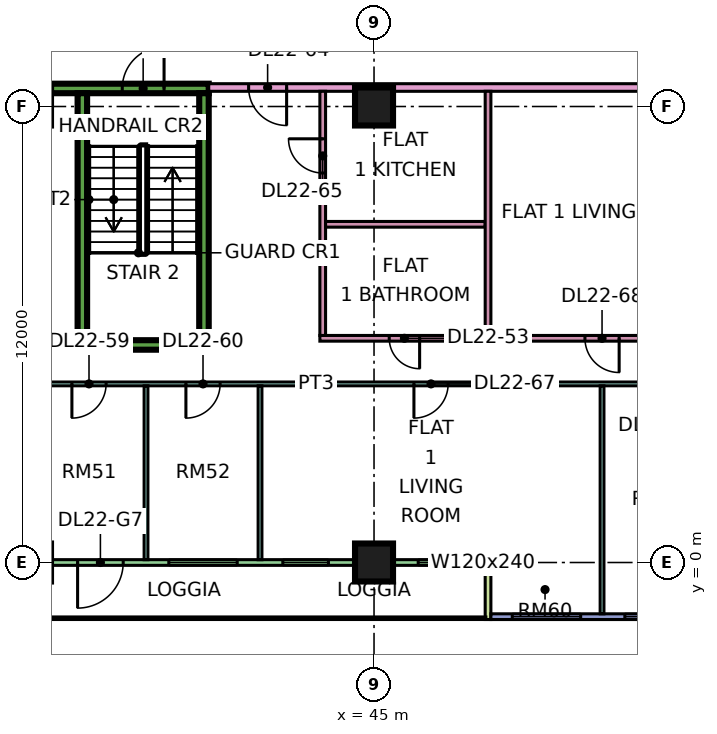
"""IFC4 building model, lengths in metres.
Left out: names, types, materials, properties, quantities, classifications, styles, units other than length and angle.
Written with IfcOpenShell. Run it as: python <this file> out.ifc"""

import sys

from ifc_helpers import new_model, si_unit, direction, frame, frame_2d, origin, origin_2d, place, context, subcontext, project, spatial, rectangle, extrude, element, fill, save


model = new_model("IFC4")
c1 = context("Model", 3, precision=1e-05, world=origin(), true_north=direction((0.0, 1.0)))
c2 = subcontext(c1, "Body", "Model", "MODEL_VIEW")
j1 = project(units=[si_unit("LENGTHUNIT", "METRE"), si_unit("PLANEANGLEUNIT", "RADIAN")], contexts=[c1])
p1 = place(None, origin())
s1 = spatial("IfcSite", under=j1, at=p1, CompositionType="ELEMENT")
p2 = place(p1, origin())
s2 = spatial("IfcBuilding", under=s1, at=p2, CompositionType="ELEMENT")
p3 = place(p2, frame((0.0, 0.0, 99.4)))
s3 = spatial("IfcBuildingStorey", under=s2, at=p3, CompositionType="ELEMENT", Elevation=99.4)
for number, where, z_axis, x_axis in (
    (1, (45.0, 0.0, 0.0), (0.0, 0.0, 1.0), (1.0, 0.0, 0.0)),
    (2, (45.0, 12.0, 0.0), (0.0, 0.0, 1.0), (1.0, 0.0, 0.0)),
):
    element("IfcColumn", number, at=place(p3, frame(where, z_axis=z_axis, x_axis=x_axis)), inside=s3, PredefinedType="COLUMN", context=c2, shape_type="SweptSolid", body=[
        extrude(rectangle(XDim=1.0, YDim=1.0, at=origin_2d()), origin(), (0.0, 0.0, 1.0), 3.75),
    ])
p4 = place(p3, frame((37.2, 5.725, 0.0), z_axis=(0.0, 0.0, 1.0), x_axis=(1.0, 0.0, 0.0)))
e3 = element("IfcWall", 3, at=p4, inside=s3, PredefinedType="SHEAR", context=c2, shape_type="SweptSolid", body=[
    extrude(rectangle(XDim=3.45, YDim=0.25, at=frame_2d((1.725, 0.0))), origin(), (0.0, 0.0, 1.0), 3.75),
])
p5 = place(p3, frame((36.5, 12.475, 0.0), z_axis=(0.0, 0.0, 1.0), x_axis=(1.0, 0.0, 0.0)))
e4 = element("IfcWall", 4, at=p5, inside=s3, PredefinedType="SHEAR", context=c2, shape_type="SweptSolid", body=[
    extrude(rectangle(XDim=4.15, YDim=0.25, at=frame_2d((2.075, 0.0))), origin(), (0.0, 0.0, 1.0), 3.75),
])
p6 = place(p5, frame((1.875, 0.0, 0.0)))
e5 = element("IfcOpeningElement", 5, at=p6, cuts=e4, PredefinedType="OPENING", context=c2, shape_type="SweptSolid", body=[
    extrude(rectangle(XDim=1.1, YDim=2.2, at=frame_2d((0.55, 1.1))), frame((0.0, 0.135, 0.0), z_axis=(0.0, -1.0, 0.0), x_axis=(1.0, 0.0, 0.0)), (0.0, 0.0, 1.0), 0.27),
])
for number, where, z_axis, x_axis in (
    (6, (37.325, 5.85, 0.0), (0.0, 0.0, 1.0), (0.0, 1.0, 0.0)),
    (7, (40.525, 5.85, 0.0), (0.0, 0.0, 1.0), (0.0, 1.0, 0.0)),
):
    element("IfcWall", number, at=place(p3, frame(where, z_axis=z_axis, x_axis=x_axis)), inside=s3, PredefinedType="SHEAR", context=c2, shape_type="SweptSolid", body=[
        extrude(rectangle(XDim=6.5, YDim=0.25, at=frame_2d((3.25, 0.0))), origin(), (0.0, 0.0, 1.0), 3.75),
    ])
p7 = place(p3, frame((36.075, 0.0, 0.0), z_axis=(0.0, 0.0, 1.0), x_axis=(1.0, 0.0, 0.0)))
e8 = element("IfcWall", 8, at=p7, inside=s3, PredefinedType="SOLIDWALL", context=c2, shape_type="SweptSolid", body=[
    extrude(rectangle(XDim=11.85, YDim=0.15, at=frame_2d((5.925, 0.0))), origin(), (0.0, 0.0, 1.0), 3.35),
])
p8 = place(p7, frame((1.125, 0.0, 0.0)))
e9 = element("IfcOpeningElement", 9, at=p8, cuts=e8, PredefinedType="OPENING", context=c2, shape_type="SweptSolid", body=[
    extrude(rectangle(XDim=1.2, YDim=2.4, at=frame_2d((0.6, 1.2))), frame((0.0, 0.085, 0.0), z_axis=(0.0, -1.0, 0.0), x_axis=(1.0, 0.0, 0.0)), (0.0, 0.0, 1.0), 0.17),
])
p9 = place(p7, frame((3.525, 0.0, 0.45)))
e10 = element("IfcOpeningElement", 10, at=p9, cuts=e8, PredefinedType="OPENING", context=c2, shape_type="SweptSolid", body=[
    extrude(rectangle(XDim=1.8, YDim=2.4, at=frame_2d((0.9, 1.2))), frame((0.0, 0.085, 0.0), z_axis=(0.0, -1.0, 0.0), x_axis=(1.0, 0.0, 0.0)), (0.0, 0.0, 1.0), 0.17),
])
p10 = place(p7, frame((6.525, 0.0, 0.45)))
e11 = element("IfcOpeningElement", 11, at=p10, cuts=e8, PredefinedType="OPENING", context=c2, shape_type="SweptSolid", body=[
    extrude(rectangle(XDim=1.2, YDim=2.4, at=frame_2d((0.6, 1.2))), frame((0.0, 0.085, 0.0), z_axis=(0.0, -1.0, 0.0), x_axis=(1.0, 0.0, 0.0)), (0.0, 0.0, 1.0), 0.17),
])
p11 = place(p7, frame((10.087, 0.0, 0.45)))
e12 = element("IfcOpeningElement", 12, at=p11, cuts=e8, PredefinedType="OPENING", context=c2, shape_type="SweptSolid", body=[
    extrude(rectangle(XDim=1.2, YDim=2.4, at=frame_2d((0.6, 1.2))), frame((0.0, 0.085, 0.0), z_axis=(0.0, -1.0, 0.0), x_axis=(1.0, 0.0, 0.0)), (0.0, 0.0, 1.0), 0.17),
])
p12 = place(p3, frame((48.0, -1.5, 0.0), z_axis=(0.0, 0.0, 1.0), x_axis=(0.0, 1.0, 0.0)))
e13 = element("IfcWall", 13, at=p12, inside=s3, PredefinedType="SOLIDWALL", context=c2, shape_type="SweptSolid", body=[
    extrude(rectangle(XDim=1.5, YDim=0.15, at=frame_2d((0.75, 0.0))), origin(), (0.0, 0.0, 1.0), 3.35),
])
p13 = place(p3, frame((48.075, -1.425, 0.0), z_axis=(0.0, 0.0, 1.0), x_axis=(1.0, 0.0, 0.0)))
e14 = element("IfcWall", 14, at=p13, inside=s3, PredefinedType="SOLIDWALL", context=c2, shape_type="SweptSolid", body=[
    extrude(rectangle(XDim=11.85, YDim=0.15, at=frame_2d((5.925, 0.0))), origin(), (0.0, 0.0, 1.0), 3.35),
])
p14 = place(p13, frame((0.562, 0.0, 0.45)))
e15 = element("IfcOpeningElement", 15, at=p14, cuts=e14, PredefinedType="OPENING", context=c2, shape_type="SweptSolid", body=[
    extrude(rectangle(XDim=1.8, YDim=2.4, at=frame_2d((0.9, 1.2))), frame((0.0, 0.085, 0.0), z_axis=(0.0, -1.0, 0.0), x_axis=(1.0, 0.0, 0.0)), (0.0, 0.0, 1.0), 0.17),
])
p15 = place(p13, frame((3.525, 0.0, 0.45)))
e16 = element("IfcOpeningElement", 16, at=p15, cuts=e14, PredefinedType="OPENING", context=c2, shape_type="SweptSolid", body=[
    extrude(rectangle(XDim=1.8, YDim=2.4, at=frame_2d((0.9, 1.2))), frame((0.0, 0.085, 0.0), z_axis=(0.0, -1.0, 0.0), x_axis=(1.0, 0.0, 0.0)), (0.0, 0.0, 1.0), 0.17),
])
p16 = place(p13, frame((6.525, 0.0, 0.45)))
e17 = element("IfcOpeningElement", 17, at=p16, cuts=e14, PredefinedType="OPENING", context=c2, shape_type="SweptSolid", body=[
    extrude(rectangle(XDim=1.8, YDim=2.4, at=frame_2d((0.9, 1.2))), frame((0.0, 0.085, 0.0), z_axis=(0.0, -1.0, 0.0), x_axis=(1.0, 0.0, 0.0)), (0.0, 0.0, 1.0), 0.17),
])
p17 = place(p13, frame((9.488, 0.0, 0.45)))
e18 = element("IfcOpeningElement", 18, at=p17, cuts=e14, PredefinedType="OPENING", context=c2, shape_type="SweptSolid", body=[
    extrude(rectangle(XDim=1.8, YDim=2.4, at=frame_2d((0.9, 1.2))), frame((0.0, 0.085, 0.0), z_axis=(0.0, -1.0, 0.0), x_axis=(1.0, 0.0, 0.0)), (0.0, 0.0, 1.0), 0.17),
])
p18 = place(p3, frame((33.05, 4.7, 0.0), z_axis=(0.0, 0.0, 1.0), x_axis=(1.0, 0.0, 0.0)))
e19 = element("IfcWall", 19, at=p18, inside=s3, PredefinedType="PARTITIONING", context=c2, shape_type="SweptSolid", body=[
    extrude(rectangle(XDim=20.85, YDim=0.1, at=frame_2d((10.425, 0.0))), origin(), (0.0, 0.0, 1.0), 3.35),
])
p19 = place(p18, frame((1.0, 0.0, 0.0)))
e20 = element("IfcOpeningElement", 20, at=p19, cuts=e19, PredefinedType="OPENING", context=c2, shape_type="SweptSolid", body=[
    extrude(rectangle(XDim=0.9, YDim=2.1, at=frame_2d((0.45, 1.05))), frame((0.0, 0.06, 0.0), z_axis=(0.0, -1.0, 0.0), x_axis=(1.0, 0.0, 0.0)), (0.0, 0.0, 1.0), 0.12),
])
p20 = place(p18, frame((4.0, 0.0, 0.0)))
e21 = element("IfcOpeningElement", 21, at=p20, cuts=e19, PredefinedType="OPENING", context=c2, shape_type="SweptSolid", body=[
    extrude(rectangle(XDim=0.9, YDim=2.1, at=frame_2d((0.45, 1.05))), frame((0.0, 0.06, 0.0), z_axis=(0.0, -1.0, 0.0), x_axis=(1.0, 0.0, 0.0)), (0.0, 0.0, 1.0), 0.12),
])
p21 = place(p18, frame((7.0, 0.0, 0.0)))
e22 = element("IfcOpeningElement", 22, at=p21, cuts=e19, PredefinedType="OPENING", context=c2, shape_type="SweptSolid", body=[
    extrude(rectangle(XDim=0.9, YDim=2.1, at=frame_2d((0.45, 1.05))), frame((0.0, 0.06, 0.0), z_axis=(0.0, -1.0, 0.0), x_axis=(1.0, 0.0, 0.0)), (0.0, 0.0, 1.0), 0.12),
])
p22 = place(p18, frame((19.0, 0.0, 0.0)))
e23 = element("IfcOpeningElement", 23, at=p22, cuts=e19, PredefinedType="OPENING", context=c2, shape_type="SweptSolid", body=[
    extrude(rectangle(XDim=0.9, YDim=2.1, at=frame_2d((0.45, 1.05))), frame((0.0, 0.06, 0.0), z_axis=(0.0, -1.0, 0.0), x_axis=(1.0, 0.0, 0.0)), (0.0, 0.0, 1.0), 0.12),
])
p23 = place(p18, frame((13.0, 0.0, 0.0)))
e24 = element("IfcOpeningElement", 24, at=p23, cuts=e19, PredefinedType="OPENING", context=c2, shape_type="SweptSolid", body=[
    extrude(rectangle(XDim=0.9, YDim=2.1, at=frame_2d((0.45, 1.05))), frame((0.0, 0.06, 0.0), z_axis=(0.0, -1.0, 0.0), x_axis=(1.0, 0.0, 0.0)), (0.0, 0.0, 1.0), 0.12),
])
p24 = place(p3, frame((39.0, 0.074, 0.0), z_axis=(0.0, 0.0, 1.0), x_axis=(0.0, 1.0, 0.0)))
e25 = element("IfcWall", 25, at=p24, inside=s3, PredefinedType="PARTITIONING", context=c2, shape_type="SweptSolid", body=[
    extrude(rectangle(XDim=4.576, YDim=0.1, at=frame_2d((2.288, 0.0))), origin(), (0.0, 0.0, 1.0), 3.35),
])
p25 = place(p3, frame((40.65, 12.5, 0.0), z_axis=(0.0, 0.0, 1.0), x_axis=(1.0, 0.0, 0.0)))
e26 = element("IfcWall", 26, at=p25, inside=s3, PredefinedType="PARTITIONING", context=c2, shape_type="SweptSolid", body=[
    extrude(rectangle(XDim=31.276, YDim=0.2, at=frame_2d((15.638, 0.0))), origin(), (0.0, 0.0, 1.0), 3.35),
])
p26 = place(p25, frame((14.25, 0.0, 0.0)))
e27 = element("IfcOpeningElement", 27, at=p26, cuts=e26, PredefinedType="OPENING", context=c2, shape_type="SweptSolid", body=[
    extrude(rectangle(XDim=1.0, YDim=2.1, at=frame_2d((0.5, 1.05))), frame((0.0, 0.11, 0.0), z_axis=(0.0, -1.0, 0.0), x_axis=(1.0, 0.0, 0.0)), (0.0, 0.0, 1.0), 0.22),
])
p27 = place(p25, frame((1.05, 0.0, 0.0)))
e28 = element("IfcOpeningElement", 28, at=p27, cuts=e26, PredefinedType="OPENING", context=c2, shape_type="SweptSolid", body=[
    extrude(rectangle(XDim=1.0, YDim=2.1, at=frame_2d((0.5, 1.05))), frame((0.0, 0.11, 0.0), z_axis=(0.0, -1.0, 0.0), x_axis=(1.0, 0.0, 0.0)), (0.0, 0.0, 1.0), 0.22),
])
p28 = place(p3, frame((42.0, 0.074, 0.0), z_axis=(0.0, 0.0, 1.0), x_axis=(0.0, 1.0, 0.0)))
e29 = element("IfcWall", 29, at=p28, inside=s3, PredefinedType="PARTITIONING", context=c2, shape_type="SweptSolid", body=[
    extrude(rectangle(XDim=4.576, YDim=0.1, at=frame_2d((2.288, 0.0))), origin(), (0.0, 0.0, 1.0), 3.35),
])
p29 = place(p3, frame((43.575, 5.9, 0.0), z_axis=(0.0, 0.0, 1.0), x_axis=(1.0, 0.0, 0.0)))
e30 = element("IfcWall", 30, at=p29, inside=s3, PredefinedType="PARTITIONING", context=c2, shape_type="SweptSolid", body=[
    extrude(rectangle(XDim=10.325, YDim=0.15, at=frame_2d((5.163, 0.0))), origin(), (0.0, 0.0, 1.0), 3.35),
])
p30 = place(p29, frame((1.825, 0.0, 0.0)))
e31 = element("IfcOpeningElement", 31, at=p30, cuts=e30, PredefinedType="OPENING", context=c2, shape_type="SweptSolid", body=[
    extrude(rectangle(XDim=0.8, YDim=2.1, at=frame_2d((0.4, 1.05))), frame((0.0, 0.085, 0.0), z_axis=(0.0, -1.0, 0.0), x_axis=(1.0, 0.0, 0.0)), (0.0, 0.0, 1.0), 0.17),
])
p31 = place(p29, frame((6.975, 0.0, 0.0)))
e32 = element("IfcOpeningElement", 32, at=p31, cuts=e30, PredefinedType="OPENING", context=c2, shape_type="SweptSolid", body=[
    extrude(rectangle(XDim=0.9, YDim=2.1, at=frame_2d((0.45, 1.05))), frame((0.0, 0.085, 0.0), z_axis=(0.0, -1.0, 0.0), x_axis=(1.0, 0.0, 0.0)), (0.0, 0.0, 1.0), 0.17),
])
p32 = place(p3, frame((43.65, 5.975, 0.0), z_axis=(0.0, 0.0, 1.0), x_axis=(0.0, 1.0, 0.0)))
e33 = element("IfcWall", 33, at=p32, inside=s3, PredefinedType="PARTITIONING", context=c2, shape_type="SweptSolid", body=[
    extrude(rectangle(XDim=6.425, YDim=0.15, at=frame_2d((3.212, 0.0))), origin(), (0.0, 0.0, 1.0), 3.35),
])
p33 = place(p32, frame((4.275, 0.0, 0.0)))
e34 = element("IfcOpeningElement", 34, at=p33, cuts=e33, PredefinedType="OPENING", context=c2, shape_type="SweptSolid", body=[
    extrude(rectangle(XDim=0.9, YDim=2.1, at=frame_2d((0.45, 1.05))), frame((0.0, 0.085, 0.0), z_axis=(0.0, -1.0, 0.0), x_axis=(1.0, 0.0, 0.0)), (0.0, 0.0, 1.0), 0.17),
])
p34 = place(p3, frame((43.725, 8.9, 0.0), z_axis=(0.0, 0.0, 1.0), x_axis=(1.0, 0.0, 0.0)))
e35 = element("IfcWall", 35, at=p34, inside=s3, PredefinedType="PARTITIONING", context=c2, shape_type="SweptSolid", body=[
    extrude(rectangle(XDim=4.2, YDim=0.15, at=frame_2d((2.1, 0.0))), origin(), (0.0, 0.0, 1.0), 3.35),
])
p35 = place(p3, frame((48.0, 5.975, 0.0), z_axis=(0.0, 0.0, 1.0), x_axis=(0.0, 1.0, 0.0)))
e36 = element("IfcWall", 36, at=p35, inside=s3, PredefinedType="PARTITIONING", context=c2, shape_type="SweptSolid", body=[
    extrude(rectangle(XDim=6.425, YDim=0.15, at=frame_2d((3.212, 0.0))), origin(), (0.0, 0.0, 1.0), 3.35),
])
p36 = place(p3, frame((51.0, -1.35, 0.0), z_axis=(0.0, 0.0, 1.0), x_axis=(0.0, 1.0, 0.0)))
e37 = element("IfcWall", 37, at=p36, inside=s3, PredefinedType="PARTITIONING", context=c2, shape_type="SweptSolid", body=[
    extrude(rectangle(XDim=6.0, YDim=0.1, at=frame_2d((3.0, 0.0))), origin(), (0.0, 0.0, 1.0), 3.35),
])
p37 = place(p8, frame((1.2, 0.0, 0.0), z_axis=(0.0, 0.0, 1.0), x_axis=(-1.0, 0.0, 0.0)))
e38 = element("IfcDoor", 38, at=p37, inside=s3, OperationType="DOUBLE_DOOR_SINGLE_SWING", PredefinedType="DOOR", context=c2, shape_type="SweptSolid", body=[
    extrude(rectangle(XDim=1.2, YDim=2.4, at=frame_2d((0.6, 1.2))), frame((0.0, 0.025, 0.0), z_axis=(0.0, -1.0, 0.0), x_axis=(1.0, 0.0, 0.0)), (0.0, 0.0, 1.0), 0.05),
])
fill(e9, e38)
p38 = place(p9, origin())
e39 = element("IfcWindow", 39, at=p38, inside=s3, PartitioningType="SINGLE_PANEL", PredefinedType="WINDOW", context=c2, shape_type="SweptSolid", body=[
    extrude(rectangle(XDim=1.8, YDim=2.4, at=frame_2d((0.9, 1.2))), frame((0.0, 0.03, 0.0), z_axis=(0.0, -1.0, 0.0), x_axis=(1.0, 0.0, 0.0)), (0.0, 0.0, 1.0), 0.06),
])
fill(e10, e39)
p39 = place(p10, origin())
e40 = element("IfcWindow", 40, at=p39, inside=s3, PartitioningType="SINGLE_PANEL", PredefinedType="WINDOW", context=c2, shape_type="SweptSolid", body=[
    extrude(rectangle(XDim=1.2, YDim=2.4, at=frame_2d((0.6, 1.2))), frame((0.0, 0.03, 0.0), z_axis=(0.0, -1.0, 0.0), x_axis=(1.0, 0.0, 0.0)), (0.0, 0.0, 1.0), 0.06),
])
fill(e11, e40)
p40 = place(p11, origin())
e41 = element("IfcWindow", 41, at=p40, inside=s3, PartitioningType="SINGLE_PANEL", PredefinedType="WINDOW", context=c2, shape_type="SweptSolid", body=[
    extrude(rectangle(XDim=1.2, YDim=2.4, at=frame_2d((0.6, 1.2))), frame((0.0, 0.03, 0.0), z_axis=(0.0, -1.0, 0.0), x_axis=(1.0, 0.0, 0.0)), (0.0, 0.0, 1.0), 0.06),
])
fill(e12, e41)
p41 = place(p14, origin())
e42 = element("IfcWindow", 42, at=p41, inside=s3, PartitioningType="SINGLE_PANEL", PredefinedType="WINDOW", context=c2, shape_type="SweptSolid", body=[
    extrude(rectangle(XDim=1.8, YDim=2.4, at=frame_2d((0.9, 1.2))), frame((0.0, 0.03, 0.0), z_axis=(0.0, -1.0, 0.0), x_axis=(1.0, 0.0, 0.0)), (0.0, 0.0, 1.0), 0.06),
])
fill(e15, e42)
p42 = place(p15, origin())
e43 = element("IfcWindow", 43, at=p42, inside=s3, PartitioningType="SINGLE_PANEL", PredefinedType="WINDOW", context=c2, shape_type="SweptSolid", body=[
    extrude(rectangle(XDim=1.8, YDim=2.4, at=frame_2d((0.9, 1.2))), frame((0.0, 0.03, 0.0), z_axis=(0.0, -1.0, 0.0), x_axis=(1.0, 0.0, 0.0)), (0.0, 0.0, 1.0), 0.06),
])
fill(e16, e43)
p43 = place(p6, frame((1.1, 0.0, 0.0), z_axis=(0.0, 0.0, 1.0), x_axis=(-1.0, 0.0, 0.0)))
e44 = element("IfcDoor", 44, at=p43, inside=s3, OperationType="SINGLE_SWING_RIGHT", PredefinedType="DOOR", context=c2, shape_type="SweptSolid", body=[
    extrude(rectangle(XDim=1.1, YDim=2.2, at=frame_2d((0.55, 1.1))), frame((0.0, 0.025, 0.0), z_axis=(0.0, -1.0, 0.0), x_axis=(1.0, 0.0, 0.0)), (0.0, 0.0, 1.0), 0.05),
])
fill(e5, e44)
p44 = place(p30, origin())
e45 = element("IfcDoor", 45, at=p44, inside=s3, OperationType="SINGLE_SWING_RIGHT", PredefinedType="DOOR", context=c2, shape_type="SweptSolid", body=[
    extrude(rectangle(XDim=0.8, YDim=2.1, at=frame_2d((0.4, 1.05))), frame((0.0, 0.025, 0.0), z_axis=(0.0, -1.0, 0.0), x_axis=(1.0, 0.0, 0.0)), (0.0, 0.0, 1.0), 0.05),
])
fill(e31, e45)
p45 = place(p20, frame((0.9, 0.0, 0.0), z_axis=(0.0, 0.0, 1.0), x_axis=(-1.0, 0.0, 0.0)))
e46 = element("IfcDoor", 46, at=p45, inside=s3, OperationType="SINGLE_SWING_LEFT", PredefinedType="DOOR", context=c2, shape_type="SweptSolid", body=[
    extrude(rectangle(XDim=0.9, YDim=2.1, at=frame_2d((0.45, 1.05))), frame((0.0, 0.025, 0.0), z_axis=(0.0, -1.0, 0.0), x_axis=(1.0, 0.0, 0.0)), (0.0, 0.0, 1.0), 0.05),
])
fill(e21, e46)
p46 = place(p21, frame((0.9, 0.0, 0.0), z_axis=(0.0, 0.0, 1.0), x_axis=(-1.0, 0.0, 0.0)))
e47 = element("IfcDoor", 47, at=p46, inside=s3, OperationType="SINGLE_SWING_LEFT", PredefinedType="DOOR", context=c2, shape_type="SweptSolid", body=[
    extrude(rectangle(XDim=0.9, YDim=2.1, at=frame_2d((0.45, 1.05))), frame((0.0, 0.025, 0.0), z_axis=(0.0, -1.0, 0.0), x_axis=(1.0, 0.0, 0.0)), (0.0, 0.0, 1.0), 0.05),
])
fill(e22, e47)
p47 = place(p27, origin())
e48 = element("IfcDoor", 48, at=p47, inside=s3, OperationType="SINGLE_SWING_RIGHT", PredefinedType="DOOR", context=c2, shape_type="SweptSolid", body=[
    extrude(rectangle(XDim=1.0, YDim=2.1, at=frame_2d((0.5, 1.05))), frame((0.0, 0.025, 0.0), z_axis=(0.0, -1.0, 0.0), x_axis=(1.0, 0.0, 0.0)), (0.0, 0.0, 1.0), 0.05),
])
fill(e28, e48)
p48 = place(p33, frame((0.9, 0.0, 0.0), z_axis=(0.0, 0.0, 1.0), x_axis=(-1.0, 0.0, 0.0)))
e49 = element("IfcDoor", 49, at=p48, inside=s3, OperationType="SINGLE_SWING_RIGHT", PredefinedType="DOOR", context=c2, shape_type="SweptSolid", body=[
    extrude(rectangle(XDim=0.9, YDim=2.1, at=frame_2d((0.45, 1.05))), frame((0.0, 0.025, 0.0), z_axis=(0.0, -1.0, 0.0), x_axis=(1.0, 0.0, 0.0)), (0.0, 0.0, 1.0), 0.05),
])
fill(e34, e49)
p49 = place(p23, frame((0.9, 0.0, 0.0), z_axis=(0.0, 0.0, 1.0), x_axis=(-1.0, 0.0, 0.0)))
e50 = element("IfcDoor", 50, at=p49, inside=s3, OperationType="SINGLE_SWING_LEFT", PredefinedType="DOOR", context=c2, shape_type="SweptSolid", body=[
    extrude(rectangle(XDim=0.9, YDim=2.1, at=frame_2d((0.45, 1.05))), frame((0.0, 0.025, 0.0), z_axis=(0.0, -1.0, 0.0), x_axis=(1.0, 0.0, 0.0)), (0.0, 0.0, 1.0), 0.05),
])
fill(e24, e50)
p50 = place(p31, origin())
e51 = element("IfcDoor", 51, at=p50, inside=s3, OperationType="SINGLE_SWING_RIGHT", PredefinedType="DOOR", context=c2, shape_type="SweptSolid", body=[
    extrude(rectangle(XDim=0.9, YDim=2.1, at=frame_2d((0.45, 1.05))), frame((0.0, 0.025, 0.0), z_axis=(0.0, -1.0, 0.0), x_axis=(1.0, 0.0, 0.0)), (0.0, 0.0, 1.0), 0.05),
])
fill(e32, e51)
save(model, sys.argv[1])
